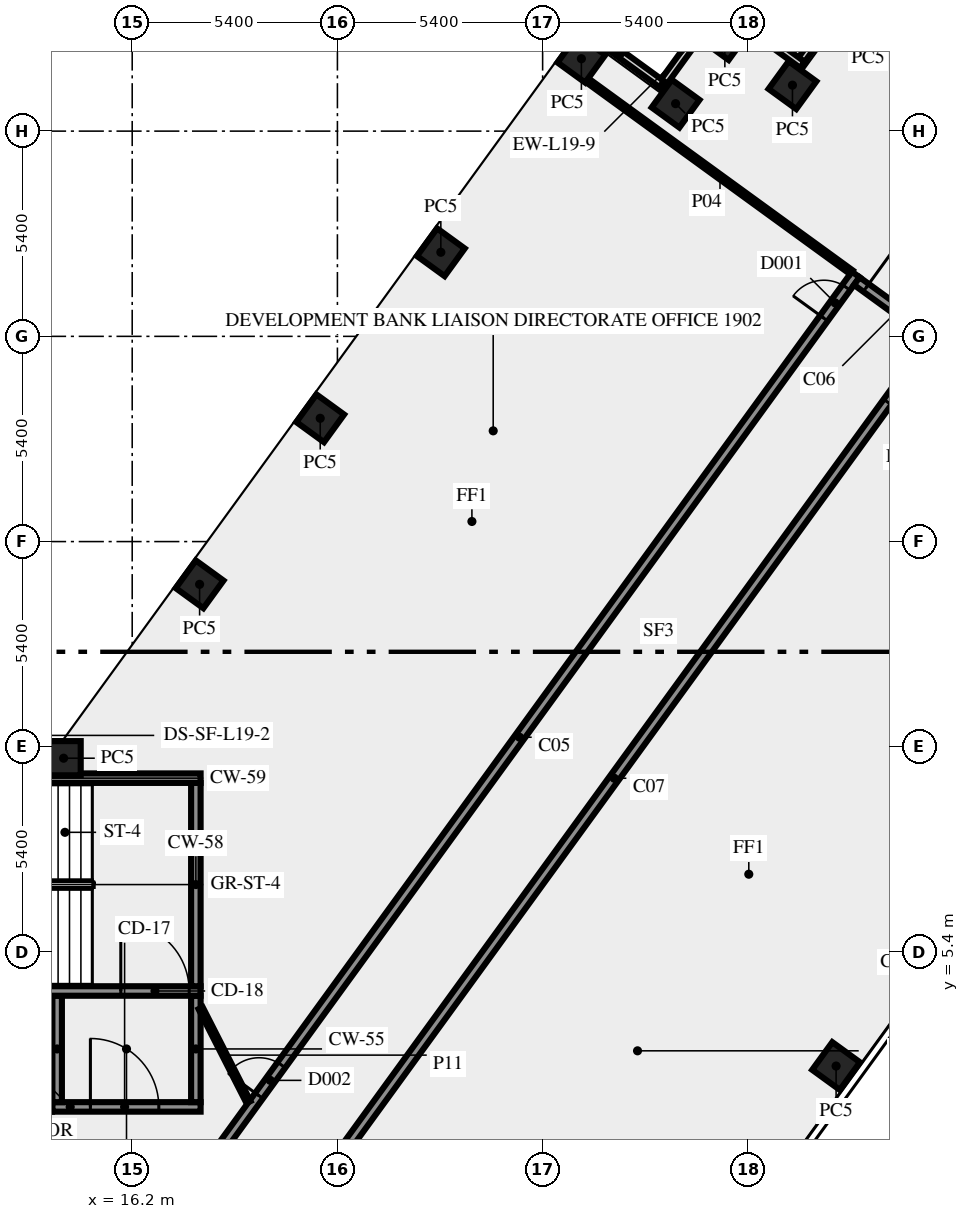
"""IFC4 building model, lengths in metres.
Left out: names, types, materials, properties, quantities, classifications, styles, units other than length and angle.
Written with IfcOpenShell. Run it as: python <this file> out.ifc"""

import sys

from ifc_helpers import new_model, si_unit, direction, frame, frame_2d, origin, origin_2d, place, context, subcontext, project, spatial, rectangle, extrude, element, fill, save


model = new_model("IFC4")
c1 = context("Model", 3, precision=1e-05, world=origin(), true_north=direction((0.0, 1.0)))
c2 = subcontext(c1, "Body", "Model", "MODEL_VIEW")
j1 = project(units=[si_unit("LENGTHUNIT", "METRE"), si_unit("PLANEANGLEUNIT", "RADIAN")], contexts=[c1])
p1 = place(None, origin())
s1 = spatial("IfcSite", under=j1, at=p1, CompositionType="ELEMENT")
p2 = place(p1, origin())
s2 = spatial("IfcBuilding", under=s1, at=p2, CompositionType="ELEMENT")
p3 = place(p2, frame((0.0, 0.0, 85.0)))
s3 = spatial("IfcBuildingStorey", under=s2, at=p3, CompositionType="ELEMENT", Elevation=85.0)
for number, where, z_axis, x_axis in (
    (1, (34.722, 2.4, 0.0), (0.0, 0.0, 1.0), (0.588, 0.809, 0.0)),
    (2, (33.574, 28.209, 0.0), (0.0, 0.0, 1.0), (-0.809, 0.588, 0.0)),
    (3, (31.795, 29.5, 0.0), (0.0, 0.0, 1.0), (-0.588, -0.809, 0.0)),
    (4, (30.499, 27.723, 0.0), (0.0, 0.0, 1.0), (-0.809, 0.588, 0.0)),
    (5, (28.02, 28.905, 0.0), (0.0, 0.0, 1.0), (-0.809, 0.588, 0.0)),
    (6, (24.321, 23.812, 0.0), (0.0, 0.0, 1.0), (-0.588, -0.809, 0.0)),
    (7, (21.147, 19.444, 0.0), (0.0, 0.0, 1.0), (-0.588, -0.809, 0.0)),
    (8, (17.974, 15.075, 0.0), (0.0, 0.0, 1.0), (-0.588, -0.809, 0.0)),
    (9, (14.395, 10.5, 0.0), (0.0, 0.0, 1.0), (-1.0, 0.0, 0.0)),
):
    element("IfcColumn", number, at=place(p3, frame(where, z_axis=z_axis, x_axis=x_axis)), inside=s3, PredefinedType="COLUMN", context=c2, shape_type="SweptSolid", body=[
        extrude(rectangle(XDim=0.9, YDim=0.9, at=origin_2d()), origin(), (0.0, 0.0, 1.0), 3.65),
    ])
for number, where, z_axis, x_axis in (
    (10, (35.351, 30.997, 0.0), (0.0, 0.0, 1.0), (-0.588, -0.809, 0.0)),
    (11, (33.838, 28.744, 0.0), (0.0, 0.0, 1.0), (-0.809, 0.588, 0.0)),
    (12, (31.67, 30.333, 0.0), (0.0, 0.0, 1.0), (-0.588, -0.809, 0.0)),
    (13, (30.133, 28.237, 0.0), (0.0, 0.0, 1.0), (-0.809, 0.588, 0.0)),
):
    element("IfcWall", number, at=place(p3, frame(where, z_axis=z_axis, x_axis=x_axis)), inside=s3, PredefinedType="SOLIDWALL", context=c2, shape_type="SweptSolid", body=[
        extrude(rectangle(XDim=2.7, YDim=0.2, at=frame_2d((1.35, 0.0))), origin(), (0.0, 0.0, 1.0), 3.65),
    ])
p4 = place(p3, frame((14.1, 1.325, 0.0), z_axis=(0.0, 0.0, 1.0), x_axis=(1.0, 0.0, 0.0)))
e14 = element("IfcWall", 14, at=p4, inside=s3, PredefinedType="SHEAR", context=c2, shape_type="SweptSolid", body=[
    extrude(rectangle(XDim=3.9, YDim=0.25, at=frame_2d((1.95, 0.0))), origin(), (0.0, 0.0, 1.0), 3.65),
])
p5 = place(p4, frame((1.0, 0.0, 0.0)))
e15 = element("IfcOpeningElement", 15, at=p5, cuts=e14, PredefinedType="OPENING", context=c2, shape_type="SweptSolid", body=[
    extrude(rectangle(XDim=1.8, YDim=2.1, at=frame_2d((0.9, 1.05))), frame((0.0, 0.135, 0.0), z_axis=(0.0, -1.0, 0.0), x_axis=(1.0, 0.0, 0.0)), (0.0, 0.0, 1.0), 0.27),
])
for number, where, z_axis, x_axis in (
    (16, (14.225, 1.45, 0.0), (0.0, 0.0, 1.0), (0.0, 1.0, 0.0)),
    (17, (17.875, 1.45, 0.0), (0.0, 0.0, 1.0), (0.0, 1.0, 0.0)),
):
    element("IfcWall", number, at=place(p3, frame(where, z_axis=z_axis, x_axis=x_axis)), inside=s3, PredefinedType="SHEAR", context=c2, shape_type="SweptSolid", body=[
        extrude(rectangle(XDim=2.8, YDim=0.25, at=frame_2d((1.4, 0.0))), origin(), (0.0, 0.0, 1.0), 3.65),
    ])
p6 = place(p3, frame((7.5, 4.375, 0.0), z_axis=(0.0, 0.0, 1.0), x_axis=(1.0, 0.0, 0.0)))
e18 = element("IfcWall", 18, at=p6, inside=s3, PredefinedType="SHEAR", context=c2, shape_type="SweptSolid", body=[
    extrude(rectangle(XDim=10.5, YDim=0.25, at=frame_2d((5.25, 0.0))), origin(), (0.0, 0.0, 1.0), 3.65),
])
p7 = place(p6, frame((8.4, 0.0, 0.0)))
e19 = element("IfcOpeningElement", 19, at=p7, cuts=e18, PredefinedType="OPENING", context=c2, shape_type="SweptSolid", body=[
    extrude(rectangle(XDim=1.8, YDim=2.1, at=frame_2d((0.9, 1.05))), frame((0.0, 0.135, 0.0), z_axis=(0.0, -1.0, 0.0), x_axis=(1.0, 0.0, 0.0)), (0.0, 0.0, 1.0), 0.27),
])
p8 = place(p3, frame((17.875, 4.5, 0.0), z_axis=(0.0, 0.0, 1.0), x_axis=(0.0, 1.0, 0.0)))
e20 = element("IfcWall", 20, at=p8, inside=s3, PredefinedType="SHEAR", context=c2, shape_type="SweptSolid", body=[
    extrude(rectangle(XDim=5.35, YDim=0.25, at=frame_2d((2.675, 0.0))), origin(), (0.0, 0.0, 1.0), 3.65),
])
p9 = place(p3, frame((7.5, 9.975, 0.0), z_axis=(0.0, 0.0, 1.0), x_axis=(1.0, 0.0, 0.0)))
e21 = element("IfcWall", 21, at=p9, inside=s3, PredefinedType="SHEAR", context=c2, shape_type="SweptSolid", body=[
    extrude(rectangle(XDim=10.5, YDim=0.25, at=frame_2d((5.25, 0.0))), origin(), (0.0, 0.0, 1.0), 3.65),
])
p10 = place(p9, frame((2.0, 0.0, 1.0)))
e22 = element("IfcOpeningElement", 22, at=p10, cuts=e21, PredefinedType="OPENING", context=c2, shape_type="SweptSolid", body=[
    extrude(rectangle(XDim=1.2, YDim=1.2, at=frame_2d((0.6, 0.6))), frame((0.0, 0.135, 0.0), z_axis=(0.0, -1.0, 0.0), x_axis=(1.0, 0.0, 0.0)), (0.0, 0.0, 1.0), 0.27),
])
p11 = place(p3, frame((17.545, -1.125, 0.0), z_axis=(0.0, 0.0, 1.0), x_axis=(0.587786330937, 0.809016210693, 0.0)))
e23 = element("IfcWall", 23, at=p11, inside=s3, PredefinedType="SOLIDWALL", context=c2, shape_type="SweptSolid", body=[
    extrude(rectangle(XDim=30.103, YDim=0.25, at=frame_2d((15.052, 0.0))), origin(), (0.0, 0.0, 1.0), 3.65),
])
p12 = place(p11, frame((28.679, 0.0, 0.0)))
e24 = element("IfcOpeningElement", 24, at=p12, cuts=e23, PredefinedType="OPENING", context=c2, shape_type="SweptSolid", body=[
    extrude(rectangle(XDim=1.0, YDim=2.1, at=frame_2d((0.5, 1.05))), frame((0.0, 0.135, 0.0), z_axis=(0.0, -1.0, 0.0), x_axis=(1.0, 0.0, 0.0)), (0.0, 0.0, 1.0), 0.27),
])
p13 = place(p11, frame((3.391, 0.0, 0.0)))
e25 = element("IfcOpeningElement", 25, at=p13, cuts=e23, PredefinedType="OPENING", context=c2, shape_type="SweptSolid", body=[
    extrude(rectangle(XDim=1.0, YDim=2.1, at=frame_2d((0.5, 1.05))), frame((0.0, 0.135, 0.0), z_axis=(0.0, -1.0, 0.0), x_axis=(1.0, 0.0, 0.0)), (0.0, 0.0, 1.0), 0.27),
])
p14 = place(p3, frame((35.267, 23.054, 0.0), z_axis=(0.0, 0.0, 1.0), x_axis=(0.809038743598, -0.587755315891, 0.0)))
e26 = element("IfcWall", 26, at=p14, inside=s3, PredefinedType="SOLIDWALL", context=c2, shape_type="SweptSolid", body=[
    extrude(rectangle(XDim=2.65, YDim=0.25, at=frame_2d((1.325, 0.0))), origin(), (0.0, 0.0, 1.0), 3.65),
])
p15 = place(p14, frame((0.3, 0.0, 0.0)))
e27 = element("IfcOpeningElement", 27, at=p15, cuts=e26, PredefinedType="OPENING", context=c2, shape_type="SweptSolid", body=[
    extrude(rectangle(XDim=1.8, YDim=2.1, at=frame_2d((0.9, 1.05))), frame((0.0, 0.135, 0.0), z_axis=(0.0, -1.0, 0.0), x_axis=(1.0, 0.0, 0.0)), (0.0, 0.0, 1.0), 0.27),
])
p16 = place(p3, frame((37.236, 21.469, 0.0), z_axis=(0.0, 0.0, 1.0), x_axis=(-0.58778344073, -0.809018310549, 0.0)))
e28 = element("IfcWall", 28, at=p16, inside=s3, PredefinedType="SOLIDWALL", context=c2, shape_type="SweptSolid", body=[
    extrude(rectangle(XDim=28.42, YDim=0.25, at=frame_2d((14.21, 0.0))), origin(), (0.0, 0.0, 1.0), 3.65),
])
p17 = place(p16, frame((26.137, 0.0, 0.0)))
e29 = element("IfcOpeningElement", 29, at=p17, cuts=e28, PredefinedType="OPENING", context=c2, shape_type="SweptSolid", body=[
    extrude(rectangle(XDim=1.8, YDim=2.1, at=frame_2d((0.9, 1.05))), frame((0.0, 0.135, 0.0), z_axis=(0.0, -1.0, 0.0), x_axis=(1.0, 0.0, 0.0)), (0.0, 0.0, 1.0), 0.27),
])
p18 = place(p16, frame((0.175, 0.0, 0.0)))
e30 = element("IfcOpeningElement", 30, at=p18, cuts=e28, PredefinedType="OPENING", context=c2, shape_type="SweptSolid", body=[
    extrude(rectangle(XDim=1.8, YDim=2.1, at=frame_2d((0.9, 1.05))), frame((0.0, 0.135, 0.0), z_axis=(0.0, -1.0, 0.0), x_axis=(1.0, 0.0, 0.0)), (0.0, 0.0, 1.0), 0.27),
])
p19 = place(p3, frame((35.126, 23.286, 0.0), z_axis=(0.0, 0.0, 1.0), x_axis=(-0.809022465264, 0.587777722186, 0.0)))
e31 = element("IfcWall", 31, at=p19, inside=s3, PredefinedType="PARTITIONING", context=c2, shape_type="SweptSolid", body=[
    extrude(rectangle(XDim=8.55, YDim=0.12, at=frame_2d((4.275, 0.0))), origin(), (0.0, 0.0, 1.0), 3.65),
])
p20 = place(p3, frame((18.0, 3.925, 0.0), z_axis=(0.0, 0.0, 1.0), x_axis=(0.453950796792, -0.891026752736, 0.0)))
e32 = element("IfcWall", 32, at=p20, inside=s3, PredefinedType="PARTITIONING", context=c2, shape_type="SweptSolid", body=[
    extrude(rectangle(XDim=2.778, YDim=0.12, at=frame_2d((1.389, 0.0))), origin(), (0.0, 0.0, 1.0), 3.65),
])
p21 = place(p5, origin())
e33 = element("IfcDoor", 33, at=p21, inside=s3, OperationType="DOUBLE_DOOR_SINGLE_SWING", PredefinedType="DOOR", context=c2, shape_type="SweptSolid", body=[
    extrude(rectangle(XDim=1.8, YDim=2.1, at=frame_2d((0.9, 1.05))), frame((0.0, 0.025, 0.0), z_axis=(0.0, -1.0, 0.0), x_axis=(1.0, 0.0, 0.0)), (0.0, 0.0, 1.0), 0.05),
])
fill(e15, e33)
p22 = place(p7, origin())
e34 = element("IfcDoor", 34, at=p22, inside=s3, OperationType="DOUBLE_DOOR_SINGLE_SWING", PredefinedType="DOOR", context=c2, shape_type="SweptSolid", body=[
    extrude(rectangle(XDim=1.8, YDim=2.1, at=frame_2d((0.9, 1.05))), frame((0.0, 0.025, 0.0), z_axis=(0.0, -1.0, 0.0), x_axis=(1.0, 0.0, 0.0)), (0.0, 0.0, 1.0), 0.05),
])
fill(e19, e34)
p23 = place(p12, origin())
e35 = element("IfcDoor", 35, at=p23, inside=s3, OperationType="SINGLE_SWING_RIGHT", PredefinedType="DOOR", context=c2, shape_type="SweptSolid", body=[
    extrude(rectangle(XDim=1.0, YDim=2.1, at=frame_2d((0.5, 1.05))), frame((0.0, 0.025, 0.0), z_axis=(0.0, -1.0, 0.0), x_axis=(1.0, 0.0, 0.0)), (0.0, 0.0, 1.0), 0.05),
])
fill(e24, e35)
p24 = place(p13, origin())
e36 = element("IfcDoor", 36, at=p24, inside=s3, OperationType="SINGLE_SWING_LEFT", PredefinedType="DOOR", context=c2, shape_type="SweptSolid", body=[
    extrude(rectangle(XDim=1.0, YDim=2.1, at=frame_2d((0.5, 1.05))), frame((0.0, 0.025, 0.0), z_axis=(0.0, -1.0, 0.0), x_axis=(1.0, 0.0, 0.0)), (0.0, 0.0, 1.0), 0.05),
])
fill(e25, e36)
p25 = place(p18, origin())
e37 = element("IfcDoor", 37, at=p25, inside=s3, OperationType="DOUBLE_DOOR_SINGLE_SWING", PredefinedType="DOOR", context=c2, shape_type="SweptSolid", body=[
    extrude(rectangle(XDim=1.8, YDim=2.1, at=frame_2d((0.9, 1.05))), frame((0.0, 0.025, 0.0), z_axis=(0.0, -1.0, 0.0), x_axis=(1.0, 0.0, 0.0)), (0.0, 0.0, 1.0), 0.05),
])
fill(e30, e37)
p26 = place(p15, origin())
e38 = element("IfcDoor", 38, at=p26, inside=s3, OperationType="DOUBLE_DOOR_SINGLE_SWING", PredefinedType="DOOR", context=c2, shape_type="SweptSolid", body=[
    extrude(rectangle(XDim=1.8, YDim=2.1, at=frame_2d((0.9, 1.05))), frame((0.0, 0.025, 0.0), z_axis=(0.0, -1.0, 0.0), x_axis=(1.0, 0.0, 0.0)), (0.0, 0.0, 1.0), 0.05),
])
fill(e27, e38)
save(model, sys.argv[1])
